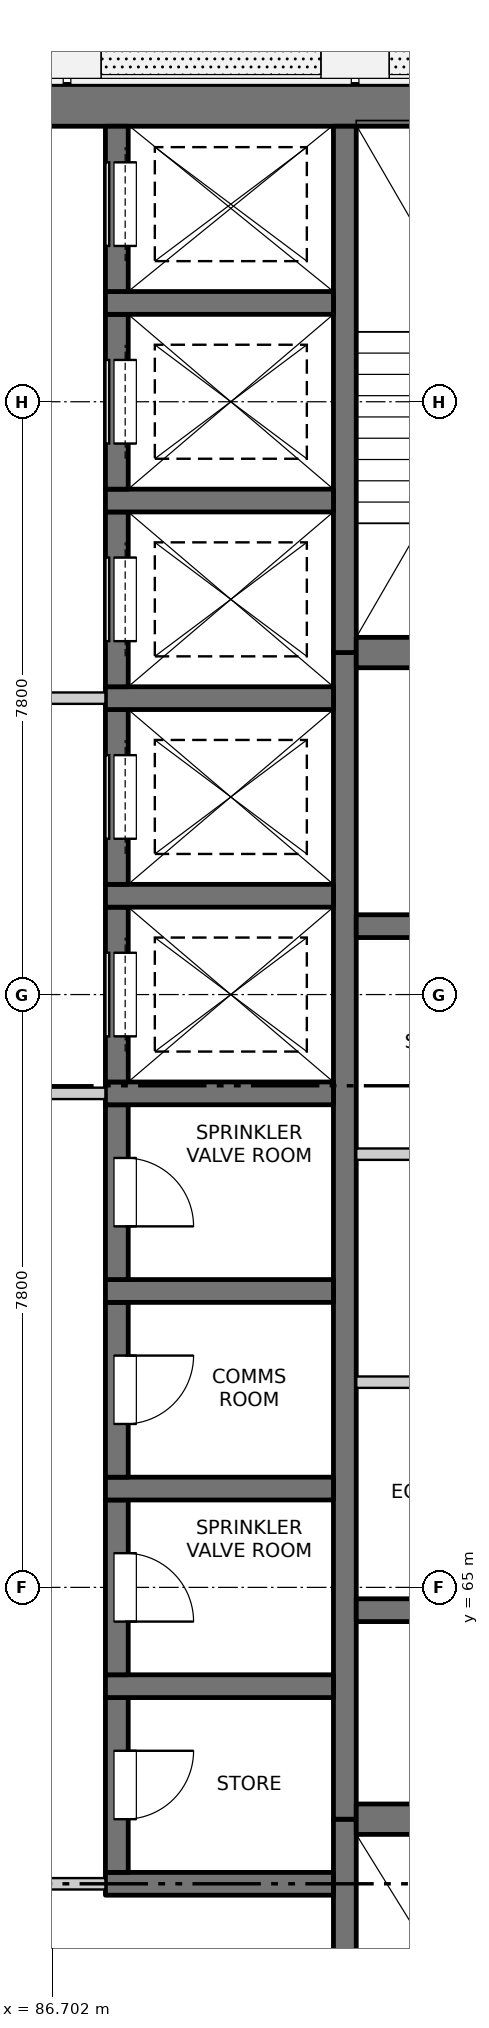
"""IFC4 building model, lengths in metres.
Left out: names, types, materials, properties, quantities, classifications, styles, units other than length and angle.
Written with IfcOpenShell. Run it as: python <this file> out.ifc"""

import sys

from ifc_helpers import new_model, si_unit, direction, frame, frame_2d, origin, place, context, subcontext, project, spatial, rectangle, extrude, element, fill, save


model = new_model("IFC4")
c1 = context("Model", 3, precision=1e-05, world=origin(), true_north=direction((0.0, 1.0)))
c2 = subcontext(c1, "Body", "Model", "MODEL_VIEW")
j1 = project(units=[si_unit("LENGTHUNIT", "METRE"), si_unit("PLANEANGLEUNIT", "RADIAN")], contexts=[c1])
p1 = place(None, origin())
s1 = spatial("IfcSite", under=j1, at=p1, CompositionType="ELEMENT")
p2 = place(p1, origin())
s2 = spatial("IfcBuilding", under=s1, at=p2, CompositionType="ELEMENT")
p3 = place(p2, frame((0.0, 0.0, 169.0)))
s3 = spatial("IfcBuildingStorey", under=s2, at=p3, CompositionType="ELEMENT", Elevation=169.0)
p4 = place(p3, frame((75.525, 84.5, -0.25), z_axis=(0.0, 0.0, 1.0), x_axis=(1.0, 0.0, 0.0)))
e1 = element("IfcWall", 1, at=p4, inside=s3, PredefinedType="SOLIDWALL", context=c2, shape_type="SweptSolid", body=[
    extrude(rectangle(XDim=18.95, YDim=0.55, at=frame_2d((9.475, 0.0))), origin(), (0.0, 0.0, 1.0), 3.35),
])
p5 = place(p3, frame((90.55, 55.525, -0.25), z_axis=(0.0, 0.0, 1.0), x_axis=(0.0, 1.0, 0.0)))
e2 = element("IfcWall", 2, at=p5, inside=s3, PredefinedType="SOLIDWALL", context=c2, shape_type="SweptSolid", body=[
    extrude(rectangle(XDim=6.425, YDim=0.3, at=frame_2d((3.212, 0.0))), origin(), (0.0, 0.0, 1.0), 3.35),
])
p6 = place(p5, frame((0.125, 0.0, 0.25)))
e3 = element("IfcOpeningElement", 3, at=p6, cuts=e2, PredefinedType="OPENING", context=c2, shape_type="SweptSolid", body=[
    extrude(rectangle(XDim=1.2, YDim=2.1, at=frame_2d((0.6, 1.05))), frame((0.0, 0.16, 0.0), z_axis=(0.0, -1.0, 0.0), x_axis=(1.0, 0.0, 0.0)), (0.0, 0.0, 1.0), 0.32),
])
p7 = place(p3, frame((90.55, 61.95, -0.25), z_axis=(0.0, 0.0, 1.0), x_axis=(0.0, 1.0, 0.0)))
e4 = element("IfcWall", 4, at=p7, inside=s3, PredefinedType="SOLIDWALL", context=c2, shape_type="SweptSolid", body=[
    extrude(rectangle(XDim=15.35, YDim=0.3, at=frame_2d((7.675, 0.0))), origin(), (0.0, 0.0, 1.0), 3.35),
])
p8 = place(p3, frame((90.55, 77.3, -0.25), z_axis=(0.0, 0.0, 1.0), x_axis=(0.0, 1.0, 0.0)))
e5 = element("IfcWall", 5, at=p8, inside=s3, PredefinedType="SOLIDWALL", context=c2, shape_type="SweptSolid", body=[
    extrude(rectangle(XDim=6.925, YDim=0.3, at=frame_2d((3.462, 0.0))), origin(), (0.0, 0.0, 1.0), 3.35),
])
p9 = place(p3, frame((87.4, 61.1, -0.25), z_axis=(0.0, 0.0, 1.0), x_axis=(1.0, 0.0, 0.0)))
e6 = element("IfcWall", 6, at=p9, inside=s3, PredefinedType="SOLIDWALL", context=c2, shape_type="SweptSolid", body=[
    extrude(rectangle(XDim=3.0, YDim=0.3, at=frame_2d((1.5, 0.0))), origin(), (0.0, 0.0, 1.0), 3.35),
])
p10 = place(p3, frame((87.55, 61.25, -0.25), z_axis=(0.0, 0.0, 1.0), x_axis=(0.0, 1.0, 0.0)))
e7 = element("IfcWall", 7, at=p10, inside=s3, PredefinedType="SOLIDWALL", context=c2, shape_type="SweptSolid", body=[
    extrude(rectangle(XDim=2.3, YDim=0.3, at=frame_2d((1.15, 0.0))), origin(), (0.0, 0.0, 1.0), 3.35),
])
p11 = place(p10, frame((0.7, 0.0, 0.25)))
e8 = element("IfcOpeningElement", 8, at=p11, cuts=e7, PredefinedType="OPENING", context=c2, shape_type="SweptSolid", body=[
    extrude(rectangle(XDim=0.9, YDim=2.1, at=frame_2d((0.45, 1.05))), frame((0.0, 0.16, 0.0), z_axis=(0.0, -1.0, 0.0), x_axis=(1.0, 0.0, 0.0)), (0.0, 0.0, 1.0), 0.32),
])
p12 = place(p3, frame((87.4, 63.7, -0.25), z_axis=(0.0, 0.0, 1.0), x_axis=(1.0, 0.0, 0.0)))
e9 = element("IfcWall", 9, at=p12, inside=s3, PredefinedType="SOLIDWALL", context=c2, shape_type="SweptSolid", body=[
    extrude(rectangle(XDim=3.0, YDim=0.3, at=frame_2d((1.5, 0.0))), origin(), (0.0, 0.0, 1.0), 3.35),
])
p13 = place(p3, frame((87.55, 63.85, -0.25), z_axis=(0.0, 0.0, 1.0), x_axis=(0.0, 1.0, 0.0)))
e10 = element("IfcWall", 10, at=p13, inside=s3, PredefinedType="SOLIDWALL", context=c2, shape_type="SweptSolid", body=[
    extrude(rectangle(XDim=2.3, YDim=0.3, at=frame_2d((1.15, 0.0))), origin(), (0.0, 0.0, 1.0), 3.35),
])
p14 = place(p13, frame((0.7, 0.0, 0.25)))
e11 = element("IfcOpeningElement", 11, at=p14, cuts=e10, PredefinedType="OPENING", context=c2, shape_type="SweptSolid", body=[
    extrude(rectangle(XDim=0.9, YDim=2.1, at=frame_2d((0.45, 1.05))), frame((0.0, 0.16, 0.0), z_axis=(0.0, -1.0, 0.0), x_axis=(1.0, 0.0, 0.0)), (0.0, 0.0, 1.0), 0.32),
])
p15 = place(p3, frame((87.4, 66.3, -0.25), z_axis=(0.0, 0.0, 1.0), x_axis=(1.0, 0.0, 0.0)))
e12 = element("IfcWall", 12, at=p15, inside=s3, PredefinedType="SOLIDWALL", context=c2, shape_type="SweptSolid", body=[
    extrude(rectangle(XDim=3.0, YDim=0.3, at=frame_2d((1.5, 0.0))), origin(), (0.0, 0.0, 1.0), 3.35),
])
p16 = place(p3, frame((87.55, 66.45, -0.25), z_axis=(0.0, 0.0, 1.0), x_axis=(0.0, 1.0, 0.0)))
e13 = element("IfcWall", 13, at=p16, inside=s3, PredefinedType="SOLIDWALL", context=c2, shape_type="SweptSolid", body=[
    extrude(rectangle(XDim=2.3, YDim=0.3, at=frame_2d((1.15, 0.0))), origin(), (0.0, 0.0, 1.0), 3.35),
])
p17 = place(p16, frame((0.7, 0.0, 0.25)))
e14 = element("IfcOpeningElement", 14, at=p17, cuts=e13, PredefinedType="OPENING", context=c2, shape_type="SweptSolid", body=[
    extrude(rectangle(XDim=0.9, YDim=2.1, at=frame_2d((0.45, 1.05))), frame((0.0, 0.16, 0.0), z_axis=(0.0, -1.0, 0.0), x_axis=(1.0, 0.0, 0.0)), (0.0, 0.0, 1.0), 0.32),
])
p18 = place(p3, frame((87.4, 68.9, -0.25), z_axis=(0.0, 0.0, 1.0), x_axis=(1.0, 0.0, 0.0)))
e15 = element("IfcWall", 15, at=p18, inside=s3, PredefinedType="SOLIDWALL", context=c2, shape_type="SweptSolid", body=[
    extrude(rectangle(XDim=3.0, YDim=0.3, at=frame_2d((1.5, 0.0))), origin(), (0.0, 0.0, 1.0), 3.35),
])
p19 = place(p3, frame((87.55, 69.05, -0.25), z_axis=(0.0, 0.0, 1.0), x_axis=(0.0, 1.0, 0.0)))
e16 = element("IfcWall", 16, at=p19, inside=s3, PredefinedType="SOLIDWALL", context=c2, shape_type="SweptSolid", body=[
    extrude(rectangle(XDim=2.3, YDim=0.3, at=frame_2d((1.15, 0.0))), origin(), (0.0, 0.0, 1.0), 3.35),
])
p20 = place(p19, frame((0.7, 0.0, 0.25)))
e17 = element("IfcOpeningElement", 17, at=p20, cuts=e16, PredefinedType="OPENING", context=c2, shape_type="SweptSolid", body=[
    extrude(rectangle(XDim=0.9, YDim=2.1, at=frame_2d((0.45, 1.05))), frame((0.0, 0.16, 0.0), z_axis=(0.0, -1.0, 0.0), x_axis=(1.0, 0.0, 0.0)), (0.0, 0.0, 1.0), 0.32),
])
p21 = place(p3, frame((87.4, 71.5, -0.25), z_axis=(0.0, 0.0, 1.0), x_axis=(1.0, 0.0, 0.0)))
e18 = element("IfcWall", 18, at=p21, inside=s3, PredefinedType="SOLIDWALL", context=c2, shape_type="SweptSolid", body=[
    extrude(rectangle(XDim=3.0, YDim=0.3, at=frame_2d((1.5, 0.0))), origin(), (0.0, 0.0, 1.0), 3.35),
])
p22 = place(p3, frame((87.55, 71.65, -0.25), z_axis=(0.0, 0.0, 1.0), x_axis=(0.0, 1.0, 0.0)))
e19 = element("IfcWall", 19, at=p22, inside=s3, PredefinedType="SOLIDWALL", context=c2, shape_type="SweptSolid", body=[
    extrude(rectangle(XDim=2.3, YDim=0.3, at=frame_2d((1.15, 0.0))), origin(), (0.0, 0.0, 1.0), 3.35),
])
p23 = place(p22, frame((0.6, 0.0, 0.25)))
e20 = element("IfcOpeningElement", 20, at=p23, cuts=e19, PredefinedType="OPENING", context=c2, shape_type="SweptSolid", body=[
    extrude(rectangle(XDim=1.1, YDim=2.1, at=frame_2d((0.55, 1.05))), frame((0.0, 0.16, 0.0), z_axis=(0.0, -1.0, 0.0), x_axis=(1.0, 0.0, 0.0)), (0.0, 0.0, 1.0), 0.32),
])
p24 = place(p3, frame((87.4, 74.1, -0.25), z_axis=(0.0, 0.0, 1.0), x_axis=(1.0, 0.0, 0.0)))
e21 = element("IfcWall", 21, at=p24, inside=s3, PredefinedType="SOLIDWALL", context=c2, shape_type="SweptSolid", body=[
    extrude(rectangle(XDim=3.0, YDim=0.3, at=frame_2d((1.5, 0.0))), origin(), (0.0, 0.0, 1.0), 3.35),
])
p25 = place(p3, frame((87.55, 74.25, -0.25), z_axis=(0.0, 0.0, 1.0), x_axis=(0.0, 1.0, 0.0)))
e22 = element("IfcWall", 22, at=p25, inside=s3, PredefinedType="SOLIDWALL", context=c2, shape_type="SweptSolid", body=[
    extrude(rectangle(XDim=2.3, YDim=0.3, at=frame_2d((1.15, 0.0))), origin(), (0.0, 0.0, 1.0), 3.35),
])
p26 = place(p25, frame((0.6, 0.0, 0.25)))
e23 = element("IfcOpeningElement", 23, at=p26, cuts=e22, PredefinedType="OPENING", context=c2, shape_type="SweptSolid", body=[
    extrude(rectangle(XDim=1.1, YDim=2.1, at=frame_2d((0.55, 1.05))), frame((0.0, 0.16, 0.0), z_axis=(0.0, -1.0, 0.0), x_axis=(1.0, 0.0, 0.0)), (0.0, 0.0, 1.0), 0.32),
])
p27 = place(p3, frame((87.4, 76.7, -0.25), z_axis=(0.0, 0.0, 1.0), x_axis=(1.0, 0.0, 0.0)))
e24 = element("IfcWall", 24, at=p27, inside=s3, PredefinedType="SOLIDWALL", context=c2, shape_type="SweptSolid", body=[
    extrude(rectangle(XDim=3.0, YDim=0.3, at=frame_2d((1.5, 0.0))), origin(), (0.0, 0.0, 1.0), 3.35),
])
p28 = place(p3, frame((87.55, 76.85, -0.25), z_axis=(0.0, 0.0, 1.0), x_axis=(0.0, 1.0, 0.0)))
e25 = element("IfcWall", 25, at=p28, inside=s3, PredefinedType="SOLIDWALL", context=c2, shape_type="SweptSolid", body=[
    extrude(rectangle(XDim=2.3, YDim=0.3, at=frame_2d((1.15, 0.0))), origin(), (0.0, 0.0, 1.0), 3.35),
])
p29 = place(p28, frame((0.6, 0.0, 0.25)))
e26 = element("IfcOpeningElement", 26, at=p29, cuts=e25, PredefinedType="OPENING", context=c2, shape_type="SweptSolid", body=[
    extrude(rectangle(XDim=1.1, YDim=2.1, at=frame_2d((0.55, 1.05))), frame((0.0, 0.16, 0.0), z_axis=(0.0, -1.0, 0.0), x_axis=(1.0, 0.0, 0.0)), (0.0, 0.0, 1.0), 0.32),
])
p30 = place(p3, frame((87.4, 79.3, -0.25), z_axis=(0.0, 0.0, 1.0), x_axis=(1.0, 0.0, 0.0)))
e27 = element("IfcWall", 27, at=p30, inside=s3, PredefinedType="SOLIDWALL", context=c2, shape_type="SweptSolid", body=[
    extrude(rectangle(XDim=3.0, YDim=0.3, at=frame_2d((1.5, 0.0))), origin(), (0.0, 0.0, 1.0), 3.35),
])
p31 = place(p3, frame((87.55, 79.45, -0.25), z_axis=(0.0, 0.0, 1.0), x_axis=(0.0, 1.0, 0.0)))
e28 = element("IfcWall", 28, at=p31, inside=s3, PredefinedType="SOLIDWALL", context=c2, shape_type="SweptSolid", body=[
    extrude(rectangle(XDim=2.3, YDim=0.3, at=frame_2d((1.15, 0.0))), origin(), (0.0, 0.0, 1.0), 3.35),
])
p32 = place(p31, frame((0.6, 0.0, 0.25)))
e29 = element("IfcOpeningElement", 29, at=p32, cuts=e28, PredefinedType="OPENING", context=c2, shape_type="SweptSolid", body=[
    extrude(rectangle(XDim=1.1, YDim=2.1, at=frame_2d((0.55, 1.05))), frame((0.0, 0.16, 0.0), z_axis=(0.0, -1.0, 0.0), x_axis=(1.0, 0.0, 0.0)), (0.0, 0.0, 1.0), 0.32),
])
p33 = place(p3, frame((87.4, 81.9, -0.25), z_axis=(0.0, 0.0, 1.0), x_axis=(1.0, 0.0, 0.0)))
e30 = element("IfcWall", 30, at=p33, inside=s3, PredefinedType="SOLIDWALL", context=c2, shape_type="SweptSolid", body=[
    extrude(rectangle(XDim=3.0, YDim=0.3, at=frame_2d((1.5, 0.0))), origin(), (0.0, 0.0, 1.0), 3.35),
])
p34 = place(p3, frame((87.55, 82.05, -0.25), z_axis=(0.0, 0.0, 1.0), x_axis=(0.0, 1.0, 0.0)))
e31 = element("IfcWall", 31, at=p34, inside=s3, PredefinedType="SOLIDWALL", context=c2, shape_type="SweptSolid", body=[
    extrude(rectangle(XDim=2.175, YDim=0.3, at=frame_2d((1.087, 0.0))), origin(), (0.0, 0.0, 1.0), 3.35),
])
p35 = place(p34, frame((0.6, 0.0, 0.25)))
e32 = element("IfcOpeningElement", 32, at=p35, cuts=e31, PredefinedType="OPENING", context=c2, shape_type="SweptSolid", body=[
    extrude(rectangle(XDim=1.1, YDim=2.1, at=frame_2d((0.55, 1.05))), frame((0.0, 0.16, 0.0), z_axis=(0.0, -1.0, 0.0), x_axis=(1.0, 0.0, 0.0)), (0.0, 0.0, 1.0), 0.32),
])
p36 = place(p3, frame((90.7, 61.95, -0.25), z_axis=(0.0, 0.0, 1.0), x_axis=(1.0, 0.0, 0.0)))
e33 = element("IfcWall", 33, at=p36, inside=s3, PredefinedType="SOLIDWALL", context=c2, shape_type="SweptSolid", body=[
    extrude(rectangle(XDim=3.775, YDim=0.4, at=frame_2d((1.888, 0.0))), origin(), (0.0, 0.0, 1.0), 3.35),
])
for number, where, z_axis, x_axis in (
    (34, (90.7, 64.7, -0.25), (0.0, 0.0, 1.0), (1.0, 0.0, 0.0)),
    (35, (90.7, 73.7, -0.25), (0.0, 0.0, 1.0), (1.0, 0.0, 0.0)),
):
    element("IfcWall", number, at=place(p3, frame(where, z_axis=z_axis, x_axis=x_axis)), inside=s3, PredefinedType="SOLIDWALL", context=c2, shape_type="SweptSolid", body=[
        extrude(rectangle(XDim=3.775, YDim=0.3, at=frame_2d((1.888, 0.0))), origin(), (0.0, 0.0, 1.0), 3.35),
    ])
p37 = place(p3, frame((90.7, 77.3, -0.25), z_axis=(0.0, 0.0, 1.0), x_axis=(1.0, 0.0, 0.0)))
e36 = element("IfcWall", 36, at=p37, inside=s3, PredefinedType="SOLIDWALL", context=c2, shape_type="SweptSolid", body=[
    extrude(rectangle(XDim=3.775, YDim=0.4, at=frame_2d((1.888, 0.0))), origin(), (0.0, 0.0, 1.0), 3.35),
])
p38 = place(p3, frame((82.6, 61.1, 0.0), z_axis=(0.0, 0.0, 1.0), x_axis=(1.0, 0.0, 0.0)))
e37 = element("IfcWall", 37, at=p38, inside=s3, PredefinedType="PARTITIONING", context=c2, shape_type="SweptSolid", body=[
    extrude(rectangle(XDim=4.8, YDim=0.15, at=frame_2d((2.4, 0.0))), origin(), (0.0, 0.0, 1.0), 3.1),
])
p39 = place(p38, frame((1.5, 0.0, 0.0)))
e38 = element("IfcOpeningElement", 38, at=p39, cuts=e37, PredefinedType="OPENING", context=c2, shape_type="SweptSolid", body=[
    extrude(rectangle(XDim=1.8, YDim=2.1, at=frame_2d((0.9, 1.05))), frame((0.0, 0.085, 0.0), z_axis=(0.0, -1.0, 0.0), x_axis=(1.0, 0.0, 0.0)), (0.0, 0.0, 1.0), 0.17),
])
for number, where, z_axis, x_axis in (
    (39, (90.7, 67.7, 0.0), (0.0, 0.0, 1.0), (1.0, 0.0, 0.0)),
    (40, (90.7, 70.7, 0.0), (0.0, 0.0, 1.0), (1.0, 0.0, 0.0)),
):
    element("IfcWall", number, at=place(p3, frame(where, z_axis=z_axis, x_axis=x_axis)), inside=s3, PredefinedType="PARTITIONING", context=c2, shape_type="SweptSolid", body=[
        extrude(rectangle(XDim=3.775, YDim=0.15, at=frame_2d((1.887, 0.0))), origin(), (0.0, 0.0, 1.0), 3.1),
    ])
p40 = place(p3, frame((82.6, 71.5, 0.0), z_axis=(0.0, 0.0, 1.0), x_axis=(1.0, 0.0, 0.0)))
e41 = element("IfcWall", 41, at=p40, inside=s3, PredefinedType="PARTITIONING", context=c2, shape_type="SweptSolid", body=[
    extrude(rectangle(XDim=4.8, YDim=0.15, at=frame_2d((2.4, 0.0))), origin(), (0.0, 0.0, 1.0), 3.1),
])
p41 = place(p40, frame((1.5, 0.0, 0.0)))
e42 = element("IfcOpeningElement", 42, at=p41, cuts=e41, PredefinedType="OPENING", context=c2, shape_type="SweptSolid", body=[
    extrude(rectangle(XDim=1.8, YDim=2.1, at=frame_2d((0.9, 1.05))), frame((0.0, 0.085, 0.0), z_axis=(0.0, -1.0, 0.0), x_axis=(1.0, 0.0, 0.0)), (0.0, 0.0, 1.0), 0.17),
])
p42 = place(p3, frame((82.6, 76.7, 0.0), z_axis=(0.0, 0.0, 1.0), x_axis=(1.0, 0.0, 0.0)))
e43 = element("IfcWall", 43, at=p42, inside=s3, PredefinedType="PARTITIONING", context=c2, shape_type="SweptSolid", body=[
    extrude(rectangle(XDim=4.8, YDim=0.15, at=frame_2d((2.4, 0.0))), origin(), (0.0, 0.0, 1.0), 3.1),
])
p43 = place(p42, frame((1.5, 0.0, 0.0)))
e44 = element("IfcOpeningElement", 44, at=p43, cuts=e43, PredefinedType="OPENING", context=c2, shape_type="SweptSolid", body=[
    extrude(rectangle(XDim=1.8, YDim=2.1, at=frame_2d((0.9, 1.05))), frame((0.0, 0.085, 0.0), z_axis=(0.0, -1.0, 0.0), x_axis=(1.0, 0.0, 0.0)), (0.0, 0.0, 1.0), 0.17),
])
p44 = place(p11, origin())
e45 = element("IfcDoor", 45, at=p44, inside=s3, OperationType="SINGLE_SWING_LEFT", PredefinedType="DOOR", context=c2, shape_type="SweptSolid", body=[
    extrude(rectangle(XDim=0.9, YDim=2.1, at=frame_2d((0.45, 1.05))), frame((0.0, -0.085, 0.0), z_axis=(0.0, -1.0, 0.0), x_axis=(1.0, 0.0, 0.0)), (0.0, 0.0, 1.0), 0.05),
])
fill(e8, e45)
p45 = place(p14, origin())
e46 = element("IfcDoor", 46, at=p45, inside=s3, OperationType="SINGLE_SWING_RIGHT", PredefinedType="DOOR", context=c2, shape_type="SweptSolid", body=[
    extrude(rectangle(XDim=0.9, YDim=2.1, at=frame_2d((0.45, 1.05))), frame((0.0, -0.085, 0.0), z_axis=(0.0, -1.0, 0.0), x_axis=(1.0, 0.0, 0.0)), (0.0, 0.0, 1.0), 0.05),
])
fill(e11, e46)
p46 = place(p17, origin())
e47 = element("IfcDoor", 47, at=p46, inside=s3, OperationType="SINGLE_SWING_LEFT", PredefinedType="DOOR", context=c2, shape_type="SweptSolid", body=[
    extrude(rectangle(XDim=0.9, YDim=2.1, at=frame_2d((0.45, 1.05))), frame((0.0, -0.085, 0.0), z_axis=(0.0, -1.0, 0.0), x_axis=(1.0, 0.0, 0.0)), (0.0, 0.0, 1.0), 0.05),
])
fill(e14, e47)
p47 = place(p20, origin())
e48 = element("IfcDoor", 48, at=p47, inside=s3, OperationType="SINGLE_SWING_RIGHT", PredefinedType="DOOR", context=c2, shape_type="SweptSolid", body=[
    extrude(rectangle(XDim=0.9, YDim=2.1, at=frame_2d((0.45, 1.05))), frame((0.0, -0.085, 0.0), z_axis=(0.0, -1.0, 0.0), x_axis=(1.0, 0.0, 0.0)), (0.0, 0.0, 1.0), 0.05),
])
fill(e17, e48)
p48 = place(p23, origin())
e49 = element("IfcDoor", 49, at=p48, inside=s3, OperationType="SLIDING_TO_LEFT", PredefinedType="DOOR", context=c2, shape_type="SweptSolid", body=[
    extrude(rectangle(XDim=1.1, YDim=2.1, at=frame_2d((0.55, 1.05))), frame((0.0, -0.085, 0.0), z_axis=(0.0, -1.0, 0.0), x_axis=(1.0, 0.0, 0.0)), (0.0, 0.0, 1.0), 0.05),
])
fill(e20, e49)
p49 = place(p26, origin())
e50 = element("IfcDoor", 50, at=p49, inside=s3, OperationType="SLIDING_TO_LEFT", PredefinedType="DOOR", context=c2, shape_type="SweptSolid", body=[
    extrude(rectangle(XDim=1.1, YDim=2.1, at=frame_2d((0.55, 1.05))), frame((0.0, -0.085, 0.0), z_axis=(0.0, -1.0, 0.0), x_axis=(1.0, 0.0, 0.0)), (0.0, 0.0, 1.0), 0.05),
])
fill(e23, e50)
p50 = place(p29, origin())
e51 = element("IfcDoor", 51, at=p50, inside=s3, OperationType="SLIDING_TO_LEFT", PredefinedType="DOOR", context=c2, shape_type="SweptSolid", body=[
    extrude(rectangle(XDim=1.1, YDim=2.1, at=frame_2d((0.55, 1.05))), frame((0.0, -0.085, 0.0), z_axis=(0.0, -1.0, 0.0), x_axis=(1.0, 0.0, 0.0)), (0.0, 0.0, 1.0), 0.05),
])
fill(e26, e51)
p51 = place(p32, origin())
e52 = element("IfcDoor", 52, at=p51, inside=s3, OperationType="SLIDING_TO_RIGHT", PredefinedType="DOOR", context=c2, shape_type="SweptSolid", body=[
    extrude(rectangle(XDim=1.1, YDim=2.1, at=frame_2d((0.55, 1.05))), frame((0.0, -0.085, 0.0), z_axis=(0.0, -1.0, 0.0), x_axis=(1.0, 0.0, 0.0)), (0.0, 0.0, 1.0), 0.05),
])
fill(e29, e52)
p52 = place(p35, origin())
e53 = element("IfcDoor", 53, at=p52, inside=s3, OperationType="SLIDING_TO_RIGHT", PredefinedType="DOOR", context=c2, shape_type="SweptSolid", body=[
    extrude(rectangle(XDim=1.1, YDim=2.1, at=frame_2d((0.55, 1.05))), frame((0.0, -0.085, 0.0), z_axis=(0.0, -1.0, 0.0), x_axis=(1.0, 0.0, 0.0)), (0.0, 0.0, 1.0), 0.05),
])
fill(e32, e53)
save(model, sys.argv[1])
